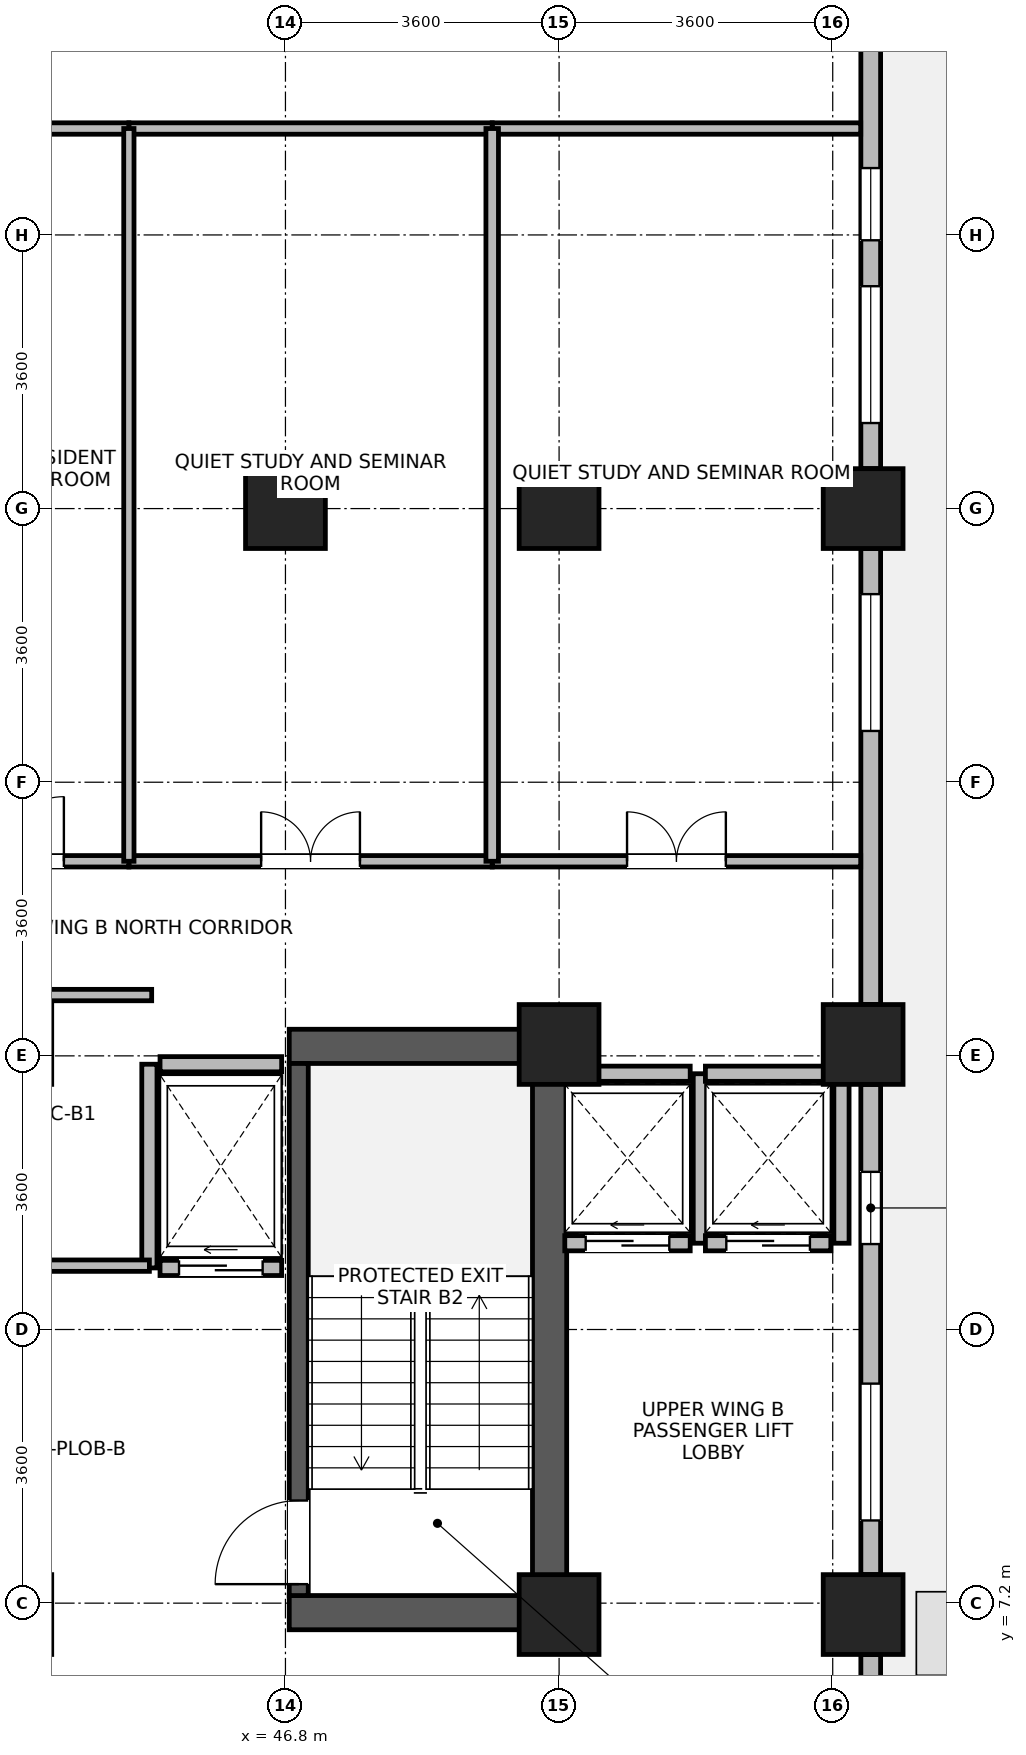
"""IFC4 building model, lengths in metres.
Left out: names, types, materials, properties, quantities, classifications, styles, units other than length and angle.
Written with IfcOpenShell. Run it as: python <this file> out.ifc"""

import sys

from ifc_helpers import new_model, si_unit, direction, frame, frame_2d, origin, origin_2d, place, context, subcontext, project, spatial, rectangle, extrude, source, transform, mapped, element, fill, save


model = new_model("IFC4")
c1 = context("Model", 3, precision=1e-05, world=origin(), true_north=direction((0.0, 1.0)))
c2 = subcontext(c1, "Body", "Model", "MODEL_VIEW")
j1 = project(units=[si_unit("LENGTHUNIT", "METRE"), si_unit("PLANEANGLEUNIT", "RADIAN")], contexts=[c1])
p1 = place(None, origin())
s1 = spatial("IfcSite", under=j1, at=p1, CompositionType="ELEMENT")
p2 = place(p1, origin())
s2 = spatial("IfcBuilding", under=s1, at=p2, CompositionType="ELEMENT")
p3 = place(p2, frame((0.0, 0.0, 143.9)))
s3 = spatial("IfcBuildingStorey", under=s2, at=p3, CompositionType="ELEMENT", Elevation=143.9)
p4 = place(p3, frame((50.275, 6.85, 0.0), z_axis=(0.0, 0.0, 1.0), x_axis=(0.0, 1.0, 0.0)))
e1 = element("IfcWall", 1, at=p4, inside=s3, PredefinedType="SHEAR", context=c2, shape_type="SweptSolid", body=[
    extrude(rectangle(XDim=7.9, YDim=0.45, at=frame_2d((3.95, 0.0))), origin(), (0.0, 0.0, 1.0), 3.46),
])
for number, where, z_axis, x_axis in (
    (2, (46.85, 7.075, 0.0), (0.0, 0.0, 1.0), (1.0, 0.0, 0.0)),
    (3, (46.85, 14.525, 0.0), (0.0, 0.0, 1.0), (1.0, 0.0, 0.0)),
):
    element("IfcWall", number, at=place(p3, frame(where, z_axis=z_axis, x_axis=x_axis)), inside=s3, PredefinedType="SHEAR", context=c2, shape_type="SweptSolid", body=[
        extrude(rectangle(XDim=3.2, YDim=0.45, at=frame_2d((1.6, 0.0))), origin(), (0.0, 0.0, 1.0), 3.46),
    ])
p5 = place(p3, frame((46.975, 7.3, 0.0), z_axis=(0.0, 0.0, 1.0), x_axis=(0.0, 1.0, 0.0)))
e4 = element("IfcWall", 4, at=p5, inside=s3, PredefinedType="SHEAR", context=c2, shape_type="SweptSolid", body=[
    extrude(rectangle(XDim=7.0, YDim=0.25, at=frame_2d((3.5, 0.0))), origin(), (0.0, 0.0, 1.0), 3.46),
])
p6 = place(p5, frame((0.15, 0.0, 0.0)))
e5 = element("IfcOpeningElement", 5, at=p6, cuts=e4, PredefinedType="OPENING", context=c2, shape_type="SweptSolid", body=[
    extrude(rectangle(XDim=1.1, YDim=2.08, at=frame_2d((0.55, 1.04))), frame((0.0, 0.135, 0.0), z_axis=(0.0, -1.0, 0.0), x_axis=(1.0, 0.0, 0.0)), (0.0, 0.0, 1.0), 0.27),
])
m1 = source(origin(), c2, "Body", "SweptSolid", [
    extrude(rectangle(XDim=1.05, YDim=1.05, at=origin_2d()), origin(), (0.0, 0.0, 1.0), 3.7),
])
for number, where, z_axis, x_axis in (
    (6, (46.8, 21.6, 0.0), (0.0, 0.0, 1.0), (1.0, 0.0, 0.0)),
    (7, (50.4, 7.05, 0.0), (0.0, 0.0, 1.0), (1.0, 0.0, 0.0)),
    (8, (50.4, 14.55, 0.0), (0.0, 0.0, 1.0), (1.0, 0.0, 0.0)),
    (9, (50.4, 21.6, 0.0), (0.0, 0.0, 1.0), (1.0, 0.0, 0.0)),
    (10, (54.4, 7.05, 0.0), (0.0, 0.0, 1.0), (1.0, 0.0, 0.0)),
    (11, (54.4, 14.55, 0.0), (0.0, 0.0, 1.0), (1.0, 0.0, 0.0)),
    (12, (54.4, 21.6, 0.0), (0.0, 0.0, 1.0), (1.0, 0.0, 0.0)),
):
    element("IfcColumn", number, at=place(p3, frame(where, z_axis=z_axis, x_axis=x_axis)), inside=s3, PredefinedType="COLUMN", context=c2, shape_type="MappedRepresentation", body=[
        mapped(m1, transform((0.0, 0.0, 0.0), x_axis=(1.0, 0.0, 0.0), y_axis=(0.0, 1.0, 0.0), z_axis=(0.0, 0.0, 1.0), scale=1.0)),
    ])
p7 = place(p3, frame((54.5, 6.524, 0.0), z_axis=(0.0, 0.0, 1.0), x_axis=(0.0, -1.0, 0.0)))
e13 = element("IfcWall", 13, at=p7, inside=s3, PredefinedType="STANDARD", context=c2, shape_type="SweptSolid", body=[
    extrude(rectangle(XDim=4.854, YDim=0.26, at=frame_2d((2.427, 0.0))), origin(), (0.0, 0.0, 1.0), 3.44),
])
p8 = place(p7, frame((2.648, 0.0, 0.0)))
e14 = element("IfcOpeningElement", 14, at=p8, cuts=e13, PredefinedType="OPENING", context=c2, shape_type="SweptSolid", body=[
    extrude(rectangle(XDim=1.5, YDim=2.15, at=frame_2d((0.75, 1.075))), frame((0.0, 0.14, 0.0), z_axis=(0.0, -1.0, 0.0), x_axis=(1.0, 0.0, 0.0)), (0.0, 0.0, 1.0), 0.28),
])
p9 = place(p3, frame((54.5, 14.024, 0.0), z_axis=(0.0, 0.0, 1.0), x_axis=(0.0, -1.0, 0.0)))
e15 = element("IfcWall", 15, at=p9, inside=s3, PredefinedType="STANDARD", context=c2, shape_type="SweptSolid", body=[
    extrude(rectangle(XDim=6.448, YDim=0.26, at=frame_2d((3.224, 0.0))), origin(), (0.0, 0.0, 1.0), 2.99),
])
p10 = place(p9, frame((3.936, 0.0, 0.85)))
e16 = element("IfcOpeningElement", 16, at=p10, cuts=e15, PredefinedType="OPENING", context=c2, shape_type="SweptSolid", body=[
    extrude(rectangle(XDim=1.8, YDim=1.85, at=frame_2d((0.9, 0.925))), frame((0.0, 0.14, 0.0), z_axis=(0.0, -1.0, 0.0), x_axis=(1.0, 0.0, 0.0)), (0.0, 0.0, 1.0), 0.28),
])
p11 = place(p9, frame((1.15, 0.0, 0.85)))
e17 = element("IfcOpeningElement", 17, at=p11, cuts=e15, PredefinedType="OPENING", context=c2, shape_type="SweptSolid", body=[
    extrude(rectangle(XDim=0.95, YDim=1.75, at=frame_2d((0.475, 0.875))), frame((0.0, 0.14, 0.0), z_axis=(0.0, -1.0, 0.0), x_axis=(1.0, 0.0, 0.0)), (0.0, 0.0, 1.0), 0.28),
])
p12 = place(p3, frame((54.5, 21.074, 0.0), z_axis=(0.0, 0.0, 1.0), x_axis=(0.0, -1.0, 0.0)))
e18 = element("IfcWall", 18, at=p12, inside=s3, PredefinedType="STANDARD", context=c2, shape_type="SweptSolid", body=[
    extrude(rectangle(XDim=5.998, YDim=0.26, at=frame_2d((2.999, 0.0))), origin(), (0.0, 0.0, 1.0), 2.99),
])
p13 = place(p12, frame((0.6, 0.0, 0.85)))
e19 = element("IfcOpeningElement", 19, at=p13, cuts=e18, PredefinedType="OPENING", context=c2, shape_type="SweptSolid", body=[
    extrude(rectangle(XDim=1.8, YDim=1.85, at=frame_2d((0.9, 0.925))), frame((0.0, 0.14, 0.0), z_axis=(0.0, -1.0, 0.0), x_axis=(1.0, 0.0, 0.0)), (0.0, 0.0, 1.0), 0.28),
])
p14 = place(p3, frame((54.5, 28.124, 0.0), z_axis=(0.0, 0.0, 1.0), x_axis=(0.0, -1.0, 0.0)))
e20 = element("IfcWall", 20, at=p14, inside=s3, PredefinedType="STANDARD", context=c2, shape_type="SweptSolid", body=[
    extrude(rectangle(XDim=5.998, YDim=0.26, at=frame_2d((2.999, 0.0))), origin(), (0.0, 0.0, 1.0), 2.99),
])
p15 = place(p14, frame((3.598, 0.0, 0.85)))
e21 = element("IfcOpeningElement", 21, at=p15, cuts=e20, PredefinedType="OPENING", context=c2, shape_type="SweptSolid", body=[
    extrude(rectangle(XDim=1.8, YDim=1.85, at=frame_2d((0.9, 0.925))), frame((0.0, 0.14, 0.0), z_axis=(0.0, -1.0, 0.0), x_axis=(1.0, 0.0, 0.0)), (0.0, 0.0, 1.0), 0.28),
])
p16 = place(p14, frame((2.044, 0.0, 0.85)))
e22 = element("IfcOpeningElement", 22, at=p16, cuts=e20, PredefinedType="OPENING", context=c2, shape_type="SweptSolid", body=[
    extrude(rectangle(XDim=0.95, YDim=1.75, at=frame_2d((0.475, 0.875))), frame((0.0, 0.14, 0.0), z_axis=(0.0, -1.0, 0.0), x_axis=(1.0, 0.0, 0.0)), (0.0, 0.0, 1.0), 0.28),
])
p17 = place(p3, frame((50.475, 11.935, 0.0), z_axis=(0.0, 0.0, 1.0), x_axis=(1.0, 0.0, 0.0)))
e23 = element("IfcWall", 23, at=p17, inside=s3, PredefinedType="PARTITIONING", context=c2, shape_type="SweptSolid", body=[
    extrude(rectangle(XDim=1.65, YDim=0.2, at=frame_2d((0.825, 0.0))), origin(), (0.0, 0.0, 1.0), 3.44),
])
p18 = place(p17, frame((0.275, 0.0, 0.0)))
e24 = element("IfcOpeningElement", 24, at=p18, cuts=e23, PredefinedType="OPENING", context=c2, shape_type="SweptSolid", body=[
    extrude(rectangle(XDim=1.1, YDim=2.12, at=frame_2d((0.55, 1.06))), frame((0.0, 0.11, 0.0), z_axis=(0.0, -1.0, 0.0), x_axis=(1.0, 0.0, 0.0)), (0.0, 0.0, 1.0), 0.22),
])
p19 = place(p3, frame((50.475, 14.165, 0.0), z_axis=(0.0, 0.0, 1.0), x_axis=(1.0, 0.0, 0.0)))
e25 = element("IfcWall", 25, at=p19, inside=s3, PredefinedType="PARTITIONING", context=c2, shape_type="SweptSolid", body=[
    extrude(rectangle(XDim=1.65, YDim=0.2, at=frame_2d((0.825, 0.0))), origin(), (0.0, 0.0, 1.0), 3.44),
])
p20 = place(p3, frame((52.265, 11.935, 0.0), z_axis=(0.0, 0.0, 1.0), x_axis=(0.0, 1.0, 0.0)))
e26 = element("IfcWall", 26, at=p20, inside=s3, PredefinedType="PARTITIONING", context=c2, shape_type="SweptSolid", body=[
    extrude(rectangle(XDim=2.23, YDim=0.2, at=frame_2d((1.115, 0.0))), origin(), (0.0, 0.0, 1.0), 3.44),
])
p21 = place(p3, frame((52.325, 11.935, 0.0), z_axis=(0.0, 0.0, 1.0), x_axis=(1.0, 0.0, 0.0)))
e27 = element("IfcWall", 27, at=p21, inside=s3, PredefinedType="PARTITIONING", context=c2, shape_type="SweptSolid", body=[
    extrude(rectangle(XDim=1.65, YDim=0.2, at=frame_2d((0.825, 0.0))), origin(), (0.0, 0.0, 1.0), 3.44),
])
p22 = place(p21, frame((0.275, 0.0, 0.0)))
e28 = element("IfcOpeningElement", 28, at=p22, cuts=e27, PredefinedType="OPENING", context=c2, shape_type="SweptSolid", body=[
    extrude(rectangle(XDim=1.1, YDim=2.12, at=frame_2d((0.55, 1.06))), frame((0.0, 0.11, 0.0), z_axis=(0.0, -1.0, 0.0), x_axis=(1.0, 0.0, 0.0)), (0.0, 0.0, 1.0), 0.22),
])
p23 = place(p3, frame((52.325, 14.165, 0.0), z_axis=(0.0, 0.0, 1.0), x_axis=(1.0, 0.0, 0.0)))
e29 = element("IfcWall", 29, at=p23, inside=s3, PredefinedType="PARTITIONING", context=c2, shape_type="SweptSolid", body=[
    extrude(rectangle(XDim=1.65, YDim=0.2, at=frame_2d((0.825, 0.0))), origin(), (0.0, 0.0, 1.0), 3.44),
])
p24 = place(p3, frame((54.115, 11.935, 0.0), z_axis=(0.0, 0.0, 1.0), x_axis=(0.0, 1.0, 0.0)))
e30 = element("IfcWall", 30, at=p24, inside=s3, PredefinedType="PARTITIONING", context=c2, shape_type="SweptSolid", body=[
    extrude(rectangle(XDim=2.23, YDim=0.2, at=frame_2d((1.115, 0.0))), origin(), (0.0, 0.0, 1.0), 2.99),
])
p25 = place(p3, frame((45.15, 11.61, 0.0), z_axis=(0.0, 0.0, 1.0), x_axis=(1.0, 0.0, 0.0)))
e31 = element("IfcWall", 31, at=p25, inside=s3, PredefinedType="PARTITIONING", context=c2, shape_type="SweptSolid", body=[
    extrude(rectangle(XDim=1.6, YDim=0.2, at=frame_2d((0.8, 0.0))), origin(), (0.0, 0.0, 1.0), 3.44),
])
p26 = place(p25, frame((0.25, 0.0, 0.0)))
e32 = element("IfcOpeningElement", 32, at=p26, cuts=e31, PredefinedType="OPENING", context=c2, shape_type="SweptSolid", body=[
    extrude(rectangle(XDim=1.1, YDim=2.12, at=frame_2d((0.55, 1.06))), frame((0.0, 0.11, 0.0), z_axis=(0.0, -1.0, 0.0), x_axis=(1.0, 0.0, 0.0)), (0.0, 0.0, 1.0), 0.22),
])
p27 = place(p3, frame((45.15, 14.29, 0.0), z_axis=(0.0, 0.0, 1.0), x_axis=(1.0, 0.0, 0.0)))
e33 = element("IfcWall", 33, at=p27, inside=s3, PredefinedType="PARTITIONING", context=c2, shape_type="SweptSolid", body=[
    extrude(rectangle(XDim=1.6, YDim=0.2, at=frame_2d((0.8, 0.0))), origin(), (0.0, 0.0, 1.0), 2.44),
])
p28 = place(p3, frame((45.01, 11.61, 0.0), z_axis=(0.0, 0.0, 1.0), x_axis=(0.0, 1.0, 0.0)))
e34 = element("IfcWall", 34, at=p28, inside=s3, PredefinedType="PARTITIONING", context=c2, shape_type="SweptSolid", body=[
    extrude(rectangle(XDim=2.68, YDim=0.2, at=frame_2d((1.34, 0.0))), origin(), (0.0, 0.0, 1.0), 3.44),
])
p29 = place(p3, frame((39.54, 11.64, 0.0), z_axis=(0.0, 0.0, 1.0), x_axis=(1.0, 0.0, 0.0)))
e35 = element("IfcWall", 35, at=p29, inside=s3, PredefinedType="PARTITIONING", context=c2, shape_type="SweptSolid", body=[
    extrude(rectangle(XDim=5.47, YDim=0.15, at=frame_2d((2.735, 0.0))), origin(), (0.0, 0.0, 1.0), 3.44),
])
p30 = place(p29, frame((2.31, 0.0, 0.0)))
e36 = element("IfcOpeningElement", 36, at=p30, cuts=e35, PredefinedType="OPENING", context=c2, shape_type="SweptSolid", body=[
    extrude(rectangle(XDim=0.85, YDim=2.04, at=frame_2d((0.425, 1.02))), frame((0.0, 0.085, 0.0), z_axis=(0.0, -1.0, 0.0), x_axis=(1.0, 0.0, 0.0)), (0.0, 0.0, 1.0), 0.17),
])
p31 = place(p3, frame((39.54, 15.2, 0.0), z_axis=(0.0, 0.0, 1.0), x_axis=(1.0, 0.0, 0.0)))
e37 = element("IfcWall", 37, at=p31, inside=s3, PredefinedType="PARTITIONING", context=c2, shape_type="SweptSolid", body=[
    extrude(rectangle(XDim=5.5, YDim=0.15, at=frame_2d((2.75, 0.0))), origin(), (0.0, 0.0, 1.0), 3.44),
])
p32 = place(p3, frame((49.52, 16.96, 0.0), z_axis=(0.0, 0.0, 1.0), x_axis=(1.0, 0.0, 0.0)))
e38 = element("IfcWall", 38, at=p32, inside=s3, PredefinedType="PARTITIONING", context=c2, shape_type="SweptSolid", body=[
    extrude(rectangle(XDim=4.848, YDim=0.15, at=frame_2d((2.424, 0.0))), origin(), (0.0, 0.0, 1.0), 3.44),
])
p33 = place(p32, frame((1.774, 0.0, 0.0)))
e39 = element("IfcOpeningElement", 39, at=p33, cuts=e38, PredefinedType="OPENING", context=c2, shape_type="SweptSolid", body=[
    extrude(rectangle(XDim=1.3, YDim=2.12, at=frame_2d((0.65, 1.06))), frame((0.0, 0.085, 0.0), z_axis=(0.0, -1.0, 0.0), x_axis=(1.0, 0.0, 0.0)), (0.0, 0.0, 1.0), 0.17),
])
p34 = place(p3, frame((49.52, 26.6, 0.0), z_axis=(0.0, 0.0, 1.0), x_axis=(1.0, 0.0, 0.0)))
e40 = element("IfcWall", 40, at=p34, inside=s3, PredefinedType="PARTITIONING", context=c2, shape_type="SweptSolid", body=[
    extrude(rectangle(XDim=4.848, YDim=0.15, at=frame_2d((2.424, 0.0))), origin(), (0.0, 0.0, 1.0), 3.44),
])
p35 = place(p3, frame((44.74, 16.96, 0.0), z_axis=(0.0, 0.0, 1.0), x_axis=(1.0, 0.0, 0.0)))
e41 = element("IfcWall", 41, at=p35, inside=s3, PredefinedType="PARTITIONING", context=c2, shape_type="SweptSolid", body=[
    extrude(rectangle(XDim=4.78, YDim=0.15, at=frame_2d((2.39, 0.0))), origin(), (0.0, 0.0, 1.0), 3.44),
])
p36 = place(p35, frame((1.74, 0.0, 0.0)))
e42 = element("IfcOpeningElement", 42, at=p36, cuts=e41, PredefinedType="OPENING", context=c2, shape_type="SweptSolid", body=[
    extrude(rectangle(XDim=1.3, YDim=2.12, at=frame_2d((0.65, 1.06))), frame((0.0, 0.085, 0.0), z_axis=(0.0, -1.0, 0.0), x_axis=(1.0, 0.0, 0.0)), (0.0, 0.0, 1.0), 0.17),
])
p37 = place(p3, frame((44.74, 26.6, 0.0), z_axis=(0.0, 0.0, 1.0), x_axis=(1.0, 0.0, 0.0)))
e43 = element("IfcWall", 43, at=p37, inside=s3, PredefinedType="PARTITIONING", context=c2, shape_type="SweptSolid", body=[
    extrude(rectangle(XDim=4.78, YDim=0.15, at=frame_2d((2.39, 0.0))), origin(), (0.0, 0.0, 1.0), 3.44),
])
p38 = place(p3, frame((42.18, 16.96, 0.0), z_axis=(0.0, 0.0, 1.0), x_axis=(1.0, 0.0, 0.0)))
e44 = element("IfcWall", 44, at=p38, inside=s3, PredefinedType="PARTITIONING", context=c2, shape_type="SweptSolid", body=[
    extrude(rectangle(XDim=2.56, YDim=0.15, at=frame_2d((1.28, 0.0))), origin(), (0.0, 0.0, 1.0), 3.44),
])
p39 = place(p38, frame((0.855, 0.0, 0.0)))
e45 = element("IfcOpeningElement", 45, at=p39, cuts=e44, PredefinedType="OPENING", context=c2, shape_type="SweptSolid", body=[
    extrude(rectangle(XDim=0.85, YDim=2.04, at=frame_2d((0.425, 1.02))), frame((0.0, 0.085, 0.0), z_axis=(0.0, -1.0, 0.0), x_axis=(1.0, 0.0, 0.0)), (0.0, 0.0, 1.0), 0.17),
])
p40 = place(p3, frame((42.18, 26.6, 0.0), z_axis=(0.0, 0.0, 1.0), x_axis=(1.0, 0.0, 0.0)))
e46 = element("IfcWall", 46, at=p40, inside=s3, PredefinedType="PARTITIONING", context=c2, shape_type="SweptSolid", body=[
    extrude(rectangle(XDim=2.56, YDim=0.15, at=frame_2d((1.28, 0.0))), origin(), (0.0, 0.0, 1.0), 3.44),
])
p41 = place(p3, frame((44.74, 16.96, 0.0), z_axis=(0.0, 0.0, 1.0), x_axis=(0.0, 1.0, 0.0)))
e47 = element("IfcWall", 47, at=p41, inside=s3, PredefinedType="PARTITIONING", context=c2, shape_type="SweptSolid", body=[
    extrude(rectangle(XDim=9.64, YDim=0.135, at=frame_2d((4.82, 0.0))), origin(), (0.0, 0.0, 1.0), 3.44),
])
p42 = place(p3, frame((49.52, 16.96, 0.0), z_axis=(0.0, 0.0, 1.0), x_axis=(0.0, 1.0, 0.0)))
e48 = element("IfcWall", 48, at=p42, inside=s3, PredefinedType="PARTITIONING", context=c2, shape_type="SweptSolid", body=[
    extrude(rectangle(XDim=9.64, YDim=0.165, at=frame_2d((4.82, 0.0))), origin(), (0.0, 0.0, 1.0), 3.44),
])
p43 = place(p10, origin())
e49 = element("IfcWindow", 49, at=p43, inside=s3, PartitioningType="SINGLE_PANEL", PredefinedType="WINDOW", context=c2, shape_type="SweptSolid", body=[
    extrude(rectangle(XDim=1.8, YDim=1.85, at=frame_2d((0.9, 0.925))), frame((0.0, 0.03, 0.0), z_axis=(0.0, -1.0, 0.0), x_axis=(1.0, 0.0, 0.0)), (0.0, 0.0, 1.0), 0.06),
])
fill(e16, e49)
p44 = place(p11, origin())
e50 = element("IfcWindow", 50, at=p44, inside=s3, PartitioningType="SINGLE_PANEL", PredefinedType="WINDOW", context=c2, shape_type="SweptSolid", body=[
    extrude(rectangle(XDim=0.95, YDim=1.75, at=frame_2d((0.475, 0.875))), frame((0.0, 0.03, 0.0), z_axis=(0.0, -1.0, 0.0), x_axis=(1.0, 0.0, 0.0)), (0.0, 0.0, 1.0), 0.06),
])
fill(e17, e50)
p45 = place(p13, origin())
e51 = element("IfcWindow", 51, at=p45, inside=s3, PartitioningType="SINGLE_PANEL", PredefinedType="WINDOW", context=c2, shape_type="SweptSolid", body=[
    extrude(rectangle(XDim=1.8, YDim=1.85, at=frame_2d((0.9, 0.925))), frame((0.0, 0.03, 0.0), z_axis=(0.0, -1.0, 0.0), x_axis=(1.0, 0.0, 0.0)), (0.0, 0.0, 1.0), 0.06),
])
fill(e19, e51)
p46 = place(p15, origin())
e52 = element("IfcWindow", 52, at=p46, inside=s3, PartitioningType="SINGLE_PANEL", PredefinedType="WINDOW", context=c2, shape_type="SweptSolid", body=[
    extrude(rectangle(XDim=1.8, YDim=1.85, at=frame_2d((0.9, 0.925))), frame((0.0, 0.03, 0.0), z_axis=(0.0, -1.0, 0.0), x_axis=(1.0, 0.0, 0.0)), (0.0, 0.0, 1.0), 0.06),
])
fill(e21, e52)
p47 = place(p16, origin())
e53 = element("IfcWindow", 53, at=p47, inside=s3, PartitioningType="SINGLE_PANEL", PredefinedType="WINDOW", context=c2, shape_type="SweptSolid", body=[
    extrude(rectangle(XDim=0.95, YDim=1.75, at=frame_2d((0.475, 0.875))), frame((0.0, 0.03, 0.0), z_axis=(0.0, -1.0, 0.0), x_axis=(1.0, 0.0, 0.0)), (0.0, 0.0, 1.0), 0.06),
])
fill(e22, e53)
p48 = place(p6, origin())
e54 = element("IfcDoor", 54, at=p48, inside=s3, OperationType="SINGLE_SWING_LEFT", PredefinedType="DOOR", context=c2, shape_type="SweptSolid", body=[
    extrude(rectangle(XDim=1.1, YDim=2.08, at=frame_2d((0.55, 1.04))), frame((0.0, 0.025, 0.0), z_axis=(0.0, -1.0, 0.0), x_axis=(1.0, 0.0, 0.0)), (0.0, 0.0, 1.0), 0.05),
])
fill(e5, e54)
p49 = place(p18, origin())
e55 = element("IfcDoor", 55, at=p49, inside=s3, OperationType="SLIDING_TO_LEFT", PredefinedType="DOOR", context=c2, shape_type="SweptSolid", body=[
    extrude(rectangle(XDim=1.1, YDim=2.12, at=frame_2d((0.55, 1.06))), frame((0.0, 0.025, 0.0), z_axis=(0.0, -1.0, 0.0), x_axis=(1.0, 0.0, 0.0)), (0.0, 0.0, 1.0), 0.05),
])
fill(e24, e55)
p50 = place(p22, origin())
e56 = element("IfcDoor", 56, at=p50, inside=s3, OperationType="SLIDING_TO_LEFT", PredefinedType="DOOR", context=c2, shape_type="SweptSolid", body=[
    extrude(rectangle(XDim=1.1, YDim=2.12, at=frame_2d((0.55, 1.06))), frame((0.0, 0.025, 0.0), z_axis=(0.0, -1.0, 0.0), x_axis=(1.0, 0.0, 0.0)), (0.0, 0.0, 1.0), 0.05),
])
fill(e28, e56)
p51 = place(p26, origin())
e57 = element("IfcDoor", 57, at=p51, inside=s3, OperationType="SLIDING_TO_LEFT", PredefinedType="DOOR", context=c2, shape_type="SweptSolid", body=[
    extrude(rectangle(XDim=1.1, YDim=2.12, at=frame_2d((0.55, 1.06))), frame((0.0, 0.025, 0.0), z_axis=(0.0, -1.0, 0.0), x_axis=(1.0, 0.0, 0.0)), (0.0, 0.0, 1.0), 0.05),
])
fill(e32, e57)
p52 = place(p33, origin())
e58 = element("IfcDoor", 58, at=p52, inside=s3, OperationType="DOUBLE_DOOR_SINGLE_SWING", PredefinedType="DOOR", context=c2, shape_type="SweptSolid", body=[
    extrude(rectangle(XDim=1.3, YDim=2.12, at=frame_2d((0.65, 1.06))), frame((0.0, 0.025, 0.0), z_axis=(0.0, -1.0, 0.0), x_axis=(1.0, 0.0, 0.0)), (0.0, 0.0, 1.0), 0.05),
])
fill(e39, e58)
p53 = place(p36, origin())
e59 = element("IfcDoor", 59, at=p53, inside=s3, OperationType="DOUBLE_DOOR_SINGLE_SWING", PredefinedType="DOOR", context=c2, shape_type="SweptSolid", body=[
    extrude(rectangle(XDim=1.3, YDim=2.12, at=frame_2d((0.65, 1.06))), frame((0.0, 0.025, 0.0), z_axis=(0.0, -1.0, 0.0), x_axis=(1.0, 0.0, 0.0)), (0.0, 0.0, 1.0), 0.05),
])
fill(e42, e59)
p54 = place(p39, origin())
e60 = element("IfcDoor", 60, at=p54, inside=s3, OperationType="SINGLE_SWING_RIGHT", PredefinedType="DOOR", context=c2, shape_type="SweptSolid", body=[
    extrude(rectangle(XDim=0.85, YDim=2.04, at=frame_2d((0.425, 1.02))), frame((0.0, 0.025, 0.0), z_axis=(0.0, -1.0, 0.0), x_axis=(1.0, 0.0, 0.0)), (0.0, 0.0, 1.0), 0.05),
])
fill(e45, e60)
save(model, sys.argv[1])
